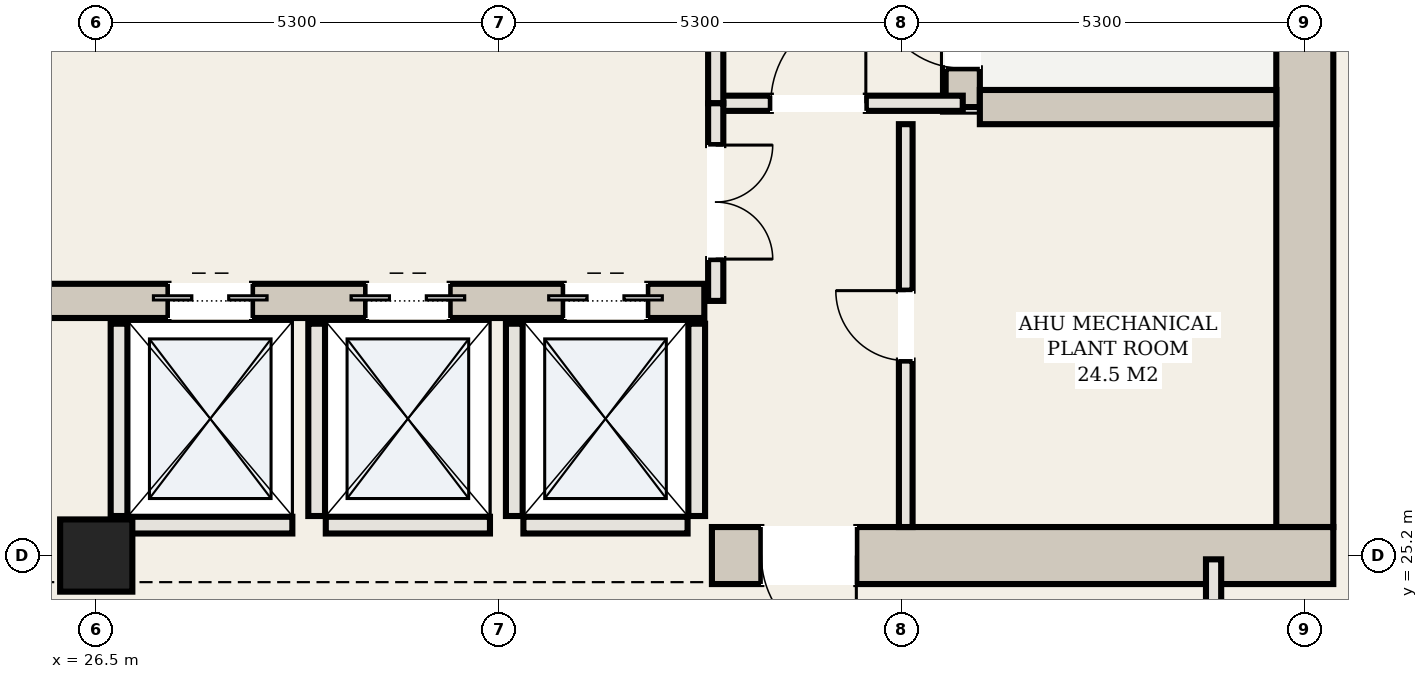
"""IFC4 building model, lengths in metres.
Left out: names, types, materials, properties, quantities, classifications, styles, units other than length and angle.
Written with IfcOpenShell. Run it as: python <this file> out.ifc"""

import sys

from ifc_helpers import new_model, si_unit, direction, frame, frame_2d, origin, origin_2d, place, context, subcontext, project, spatial, rectangle, hollow_rectangle, extrude, element, fill, save


model = new_model("IFC4")
c1 = context("Model", 3, precision=1e-05, world=origin(), true_north=direction((0.0, 1.0)))
c2 = subcontext(c1, "Body", "Model", "MODEL_VIEW")
j1 = project(units=[si_unit("LENGTHUNIT", "METRE"), si_unit("PLANEANGLEUNIT", "RADIAN")], contexts=[c1])
p1 = place(None, origin())
s1 = spatial("IfcSite", under=j1, at=p1, CompositionType="ELEMENT")
p2 = place(p1, origin())
s2 = spatial("IfcBuilding", under=s1, at=p2, CompositionType="ELEMENT")
p3 = place(p2, frame((0.0, 0.0, 127.9)))
s3 = spatial("IfcBuildingStorey", under=s2, at=p3, CompositionType="ELEMENT", Elevation=127.9)
p4 = place(p3, frame((42.4, 25.575, 0.0), z_axis=(0.0, 0.0, 1.0), x_axis=(0.0, 1.0, 0.0)))
e1 = element("IfcWall", 1, at=p4, inside=s3, PredefinedType="SHEAR", context=c2, shape_type="SweptSolid", body=[
    extrude(rectangle(XDim=14.05, YDim=0.75, at=frame_2d((7.025, 0.0))), origin(), (0.0, 0.0, 1.0), 6.56),
])
p5 = place(p3, frame((34.6, 25.2, 0.0), z_axis=(0.0, 0.0, 1.0), x_axis=(1.0, 0.0, 0.0)))
e2 = element("IfcWall", 2, at=p5, inside=s3, PredefinedType="SHEAR", context=c2, shape_type="SweptSolid", body=[
    extrude(rectangle(XDim=8.175, YDim=0.75, at=frame_2d((4.087, 0.0))), origin(), (0.0, 0.0, 1.0), 6.56),
])
p6 = place(p5, frame((0.65, 0.0, 0.0)))
e3 = element("IfcOpeningElement", 3, at=p6, cuts=e2, PredefinedType="OPENING", context=c2, shape_type="SweptSolid", body=[
    extrude(rectangle(XDim=1.25, YDim=2.2, at=frame_2d((0.625, 1.1))), frame((0.0, 0.385, 0.0), z_axis=(0.0, -1.0, 0.0), x_axis=(1.0, 0.0, 0.0)), (0.0, 0.0, 1.0), 0.77),
])
p7 = place(p3, frame((37.9, 31.1, 0.0), z_axis=(0.0, 0.0, 1.0), x_axis=(0.0, 1.0, 0.0)))
e4 = element("IfcWall", 4, at=p7, inside=s3, PredefinedType="SHEAR", context=c2, shape_type="SweptSolid", body=[
    extrude(rectangle(XDim=8.525, YDim=0.45, at=frame_2d((4.262, 0.0))), origin(), (0.0, 0.0, 1.0), 6.56),
])
p8 = place(p7, frame((0.51, 0.0, 0.0)))
e5 = element("IfcOpeningElement", 5, at=p8, cuts=e4, PredefinedType="OPENING", context=c2, shape_type="SweptSolid", body=[
    extrude(rectangle(XDim=1.15, YDim=2.2, at=frame_2d((0.575, 1.1))), frame((0.0, 0.235, 0.0), z_axis=(0.0, -1.0, 0.0), x_axis=(1.0, 0.0, 0.0)), (0.0, 0.0, 1.0), 0.47),
])
p9 = place(p3, frame((38.125, 31.1, 0.0), z_axis=(0.0, 0.0, 1.0), x_axis=(1.0, 0.0, 0.0)))
e6 = element("IfcWall", 6, at=p9, inside=s3, PredefinedType="SHEAR", context=c2, shape_type="SweptSolid", body=[
    extrude(rectangle(XDim=3.9, YDim=0.45, at=frame_2d((1.95, 0.0))), origin(), (0.0, 0.0, 1.0), 6.56),
])
p10 = place(p3, frame((18.5, 28.55, 0.0), z_axis=(0.0, 0.0, 1.0), x_axis=(1.0, 0.0, 0.0)))
e7 = element("IfcWall", 7, at=p10, inside=s3, PredefinedType="SHEAR", context=c2, shape_type="SweptSolid", body=[
    extrude(rectangle(XDim=16.0, YDim=0.45, at=frame_2d((8.0, 0.0))), origin(), (0.0, 0.0, 1.0), 6.56),
])
p11 = place(p10, frame((8.95, 0.0, 0.0)))
e8 = element("IfcOpeningElement", 8, at=p11, cuts=e7, PredefinedType="OPENING", context=c2, shape_type="SweptSolid", body=[
    extrude(rectangle(XDim=1.1, YDim=2.15, at=frame_2d((0.55, 1.075))), frame((0.0, 0.235, 0.0), z_axis=(0.0, -1.0, 0.0), x_axis=(1.0, 0.0, 0.0)), (0.0, 0.0, 1.0), 0.47),
])
p12 = place(p10, frame((11.55, 0.0, 0.0)))
e9 = element("IfcOpeningElement", 9, at=p12, cuts=e7, PredefinedType="OPENING", context=c2, shape_type="SweptSolid", body=[
    extrude(rectangle(XDim=1.1, YDim=2.15, at=frame_2d((0.55, 1.075))), frame((0.0, 0.235, 0.0), z_axis=(0.0, -1.0, 0.0), x_axis=(1.0, 0.0, 0.0)), (0.0, 0.0, 1.0), 0.47),
])
p13 = place(p10, frame((14.15, 0.0, 0.0)))
e10 = element("IfcOpeningElement", 10, at=p13, cuts=e7, PredefinedType="OPENING", context=c2, shape_type="SweptSolid", body=[
    extrude(rectangle(XDim=1.1, YDim=2.15, at=frame_2d((0.55, 1.075))), frame((0.0, 0.235, 0.0), z_axis=(0.0, -1.0, 0.0), x_axis=(1.0, 0.0, 0.0)), (0.0, 0.0, 1.0), 0.47),
])
p14 = place(p3, frame((26.5, 25.2, 0.0), z_axis=(0.0, 0.0, 1.0), x_axis=(1.0, 0.0, 0.0)))
e11 = element("IfcColumn", 11, at=p14, inside=s3, PredefinedType="COLUMN", context=c2, shape_type="SweptSolid", body=[
    extrude(hollow_rectangle(XDim=0.95, YDim=0.95, WallThickness=0.032, at=origin_2d()), origin(), (0.0, 0.0, 1.0), 6.8),
])
p15 = place(p3, frame((26.8, 25.72, 0.0), z_axis=(0.0, 0.0, 1.0), x_axis=(0.0, 1.0, 0.0)))
e12 = element("IfcWall", 12, at=p15, inside=s3, PredefinedType="SOLIDWALL", context=c2, shape_type="SweptSolid", body=[
    extrude(rectangle(XDim=2.53, YDim=0.22, at=frame_2d((1.265, 0.0))), origin(), (0.0, 0.0, 1.0), 6.56),
])
p16 = place(p3, frame((26.92, 25.6, 0.0), z_axis=(0.0, 0.0, 1.0), x_axis=(1.0, 0.0, 0.0)))
e13 = element("IfcWall", 13, at=p16, inside=s3, PredefinedType="SOLIDWALL", context=c2, shape_type="SweptSolid", body=[
    extrude(rectangle(XDim=2.16, YDim=0.22, at=frame_2d((1.08, 0.0))), origin(), (0.0, 0.0, 1.0), 6.56),
])
p17 = place(p3, frame((29.4, 25.72, 0.0), z_axis=(0.0, 0.0, 1.0), x_axis=(0.0, 1.0, 0.0)))
e14 = element("IfcWall", 14, at=p17, inside=s3, PredefinedType="SOLIDWALL", context=c2, shape_type="SweptSolid", body=[
    extrude(rectangle(XDim=2.53, YDim=0.22, at=frame_2d((1.265, 0.0))), origin(), (0.0, 0.0, 1.0), 6.56),
])
p18 = place(p3, frame((29.52, 25.6, 0.0), z_axis=(0.0, 0.0, 1.0), x_axis=(1.0, 0.0, 0.0)))
e15 = element("IfcWall", 15, at=p18, inside=s3, PredefinedType="SOLIDWALL", context=c2, shape_type="SweptSolid", body=[
    extrude(rectangle(XDim=2.16, YDim=0.22, at=frame_2d((1.08, 0.0))), origin(), (0.0, 0.0, 1.0), 6.56),
])
for number, where, z_axis, x_axis in (
    (16, (32.0, 25.72, 0.0), (0.0, 0.0, 1.0), (0.0, 1.0, 0.0)),
    (17, (34.4, 25.72, 0.0), (0.0, 0.0, 1.0), (0.0, 1.0, 0.0)),
):
    element("IfcWall", number, at=place(p3, frame(where, z_axis=z_axis, x_axis=x_axis)), inside=s3, PredefinedType="SOLIDWALL", context=c2, shape_type="SweptSolid", body=[
        extrude(rectangle(XDim=2.53, YDim=0.22, at=frame_2d((1.265, 0.0))), origin(), (0.0, 0.0, 1.0), 6.56),
    ])
p19 = place(p3, frame((32.12, 25.6, 0.0), z_axis=(0.0, 0.0, 1.0), x_axis=(1.0, 0.0, 0.0)))
e18 = element("IfcWall", 18, at=p19, inside=s3, PredefinedType="SOLIDWALL", context=c2, shape_type="SweptSolid", body=[
    extrude(rectangle(XDim=2.16, YDim=0.22, at=frame_2d((1.08, 0.0))), origin(), (0.0, 0.0, 1.0), 6.56),
])
p20 = place(p3, frame((34.65, 31.15, 0.0), z_axis=(0.0, 0.0, 1.0), x_axis=(1.0, 0.0, 0.0)))
e19 = element("IfcWall", 19, at=p20, inside=s3, PredefinedType="PARTITIONING", context=c2, shape_type="SweptSolid", body=[
    extrude(rectangle(XDim=3.25, YDim=0.2, at=frame_2d((1.625, 0.0))), origin(), (0.0, 0.0, 1.0), 6.56),
])
p21 = place(p20, frame((0.725, 0.0, 0.0)))
e20 = element("IfcOpeningElement", 20, at=p21, cuts=e19, PredefinedType="OPENING", context=c2, shape_type="SweptSolid", body=[
    extrude(rectangle(XDim=1.25, YDim=2.2, at=frame_2d((0.625, 1.1))), frame((0.0, 0.11, 0.0), z_axis=(0.0, -1.0, 0.0), x_axis=(1.0, 0.0, 0.0)), (0.0, 0.0, 1.0), 0.22),
])
p22 = place(p3, frame((34.65, 31.15, 0.0), z_axis=(0.0, 0.0, 1.0), x_axis=(0.0, 1.0, 0.0)))
e21 = element("IfcWall", 21, at=p22, inside=s3, PredefinedType="PARTITIONING", context=c2, shape_type="SweptSolid", body=[
    extrude(rectangle(XDim=5.15, YDim=0.2, at=frame_2d((2.575, 0.0))), origin(), (0.0, 0.0, 1.0), 6.56),
])
p23 = place(p22, frame((1.875, 0.0, 0.0)))
e22 = element("IfcOpeningElement", 22, at=p23, cuts=e21, PredefinedType="OPENING", context=c2, shape_type="SweptSolid", body=[
    extrude(rectangle(XDim=1.25, YDim=2.2, at=frame_2d((0.625, 1.1))), frame((0.0, 0.11, 0.0), z_axis=(0.0, -1.0, 0.0), x_axis=(1.0, 0.0, 0.0)), (0.0, 0.0, 1.0), 0.22),
])
p24 = place(p3, frame((37.15, 25.575, 0.0), z_axis=(0.0, 0.0, 1.0), x_axis=(0.0, 1.0, 0.0)))
e23 = element("IfcWall", 23, at=p24, inside=s3, PredefinedType="PARTITIONING", context=c2, shape_type="SweptSolid", body=[
    extrude(rectangle(XDim=5.3, YDim=0.18, at=frame_2d((2.65, 0.0))), origin(), (0.0, 0.0, 1.0), 5.055),
])
p25 = place(p24, frame((2.19, 0.0, 0.0)))
e24 = element("IfcOpeningElement", 24, at=p25, cuts=e23, PredefinedType="OPENING", context=c2, shape_type="SweptSolid", body=[
    extrude(rectangle(XDim=0.92, YDim=2.15, at=frame_2d((0.46, 1.075))), frame((0.0, 0.1, 0.0), z_axis=(0.0, -1.0, 0.0), x_axis=(1.0, 0.0, 0.0)), (0.0, 0.0, 1.0), 0.2),
])
p26 = place(p3, frame((34.65, 28.55, 0.0), z_axis=(0.0, 0.0, 1.0), x_axis=(0.0, 1.0, 0.0)))
e25 = element("IfcWall", 25, at=p26, inside=s3, PredefinedType="PARTITIONING", context=c2, shape_type="SweptSolid", body=[
    extrude(rectangle(XDim=2.6, YDim=0.2, at=frame_2d((1.3, 0.0))), origin(), (0.0, 0.0, 1.0), 6.56),
])
p27 = place(p26, frame((0.55, 0.0, 0.0)))
e26 = element("IfcOpeningElement", 26, at=p27, cuts=e25, PredefinedType="OPENING", context=c2, shape_type="SweptSolid", body=[
    extrude(rectangle(XDim=1.5, YDim=2.25, at=frame_2d((0.75, 1.125))), frame((0.0, 0.11, 0.0), z_axis=(0.0, -1.0, 0.0), x_axis=(1.0, 0.0, 0.0)), (0.0, 0.0, 1.0), 0.22),
])
p28 = place(p3, frame((41.2, 22.4, 0.0), z_axis=(0.0, 0.0, 1.0), x_axis=(0.0, 1.0, 0.0)))
e27 = element("IfcWall", 27, at=p28, inside=s3, PredefinedType="PARTITIONING", context=c2, shape_type="SweptSolid", body=[
    extrude(rectangle(XDim=2.75, YDim=0.2, at=frame_2d((1.375, 0.0))), origin(), (0.0, 0.0, 1.0), 6.56),
])
p29 = place(p11, origin())
e28 = element("IfcDoor", 28, at=p29, inside=s3, OperationType="DOUBLE_DOOR_SLIDING", PredefinedType="DOOR", context=c2, shape_type="SweptSolid", body=[
    extrude(rectangle(XDim=1.1, YDim=2.15, at=frame_2d((0.55, 1.075))), frame((0.0, 0.025, 0.0), z_axis=(0.0, -1.0, 0.0), x_axis=(1.0, 0.0, 0.0)), (0.0, 0.0, 1.0), 0.05),
])
fill(e8, e28)
p30 = place(p12, origin())
e29 = element("IfcDoor", 29, at=p30, inside=s3, OperationType="DOUBLE_DOOR_SLIDING", PredefinedType="DOOR", context=c2, shape_type="SweptSolid", body=[
    extrude(rectangle(XDim=1.1, YDim=2.15, at=frame_2d((0.55, 1.075))), frame((0.0, 0.025, 0.0), z_axis=(0.0, -1.0, 0.0), x_axis=(1.0, 0.0, 0.0)), (0.0, 0.0, 1.0), 0.05),
])
fill(e9, e29)
p31 = place(p13, origin())
e30 = element("IfcDoor", 30, at=p31, inside=s3, OperationType="DOUBLE_DOOR_SLIDING", PredefinedType="DOOR", context=c2, shape_type="SweptSolid", body=[
    extrude(rectangle(XDim=1.1, YDim=2.15, at=frame_2d((0.55, 1.075))), frame((0.0, 0.025, 0.0), z_axis=(0.0, -1.0, 0.0), x_axis=(1.0, 0.0, 0.0)), (0.0, 0.0, 1.0), 0.05),
])
fill(e10, e30)
p32 = place(p6, frame((1.25, 0.0, 0.0), z_axis=(0.0, 0.0, 1.0), x_axis=(-1.0, 0.0, 0.0)))
e31 = element("IfcDoor", 31, at=p32, inside=s3, OperationType="SINGLE_SWING_LEFT", PredefinedType="DOOR", context=c2, shape_type="SweptSolid", body=[
    extrude(rectangle(XDim=1.25, YDim=2.2, at=frame_2d((0.625, 1.1))), frame((0.0, 0.025, 0.0), z_axis=(0.0, -1.0, 0.0), x_axis=(1.0, 0.0, 0.0)), (0.0, 0.0, 1.0), 0.05),
])
fill(e3, e31)
p33 = place(p21, origin())
e32 = element("IfcDoor", 32, at=p33, inside=s3, OperationType="SINGLE_SWING_RIGHT", PredefinedType="DOOR", context=c2, shape_type="SweptSolid", body=[
    extrude(rectangle(XDim=1.25, YDim=2.2, at=frame_2d((0.625, 1.1))), frame((0.0, 0.025, 0.0), z_axis=(0.0, -1.0, 0.0), x_axis=(1.0, 0.0, 0.0)), (0.0, 0.0, 1.0), 0.05),
])
fill(e20, e32)
p34 = place(p8, origin())
e33 = element("IfcDoor", 33, at=p34, inside=s3, OperationType="SINGLE_SWING_RIGHT", PredefinedType="DOOR", context=c2, shape_type="SweptSolid", body=[
    extrude(rectangle(XDim=1.15, YDim=2.2, at=frame_2d((0.575, 1.1))), frame((0.0, 0.025, 0.0), z_axis=(0.0, -1.0, 0.0), x_axis=(1.0, 0.0, 0.0)), (0.0, 0.0, 1.0), 0.05),
])
fill(e5, e33)
p35 = place(p25, origin())
e34 = element("IfcDoor", 34, at=p35, inside=s3, OperationType="SINGLE_SWING_RIGHT", PredefinedType="DOOR", context=c2, shape_type="SweptSolid", body=[
    extrude(rectangle(XDim=0.92, YDim=2.15, at=frame_2d((0.46, 1.075))), frame((0.0, 0.025, 0.0), z_axis=(0.0, -1.0, 0.0), x_axis=(1.0, 0.0, 0.0)), (0.0, 0.0, 1.0), 0.05),
])
fill(e24, e34)
p36 = place(p27, frame((1.5, 0.0, 0.0), z_axis=(0.0, 0.0, 1.0), x_axis=(-1.0, 0.0, 0.0)))
e35 = element("IfcDoor", 35, at=p36, inside=s3, OperationType="DOUBLE_DOOR_SINGLE_SWING", PredefinedType="DOOR", context=c2, shape_type="SweptSolid", body=[
    extrude(rectangle(XDim=1.5, YDim=2.25, at=frame_2d((0.75, 1.125))), frame((0.0, 0.025, 0.0), z_axis=(0.0, -1.0, 0.0), x_axis=(1.0, 0.0, 0.0)), (0.0, 0.0, 1.0), 0.05),
])
fill(e26, e35)
save(model, sys.argv[1])
